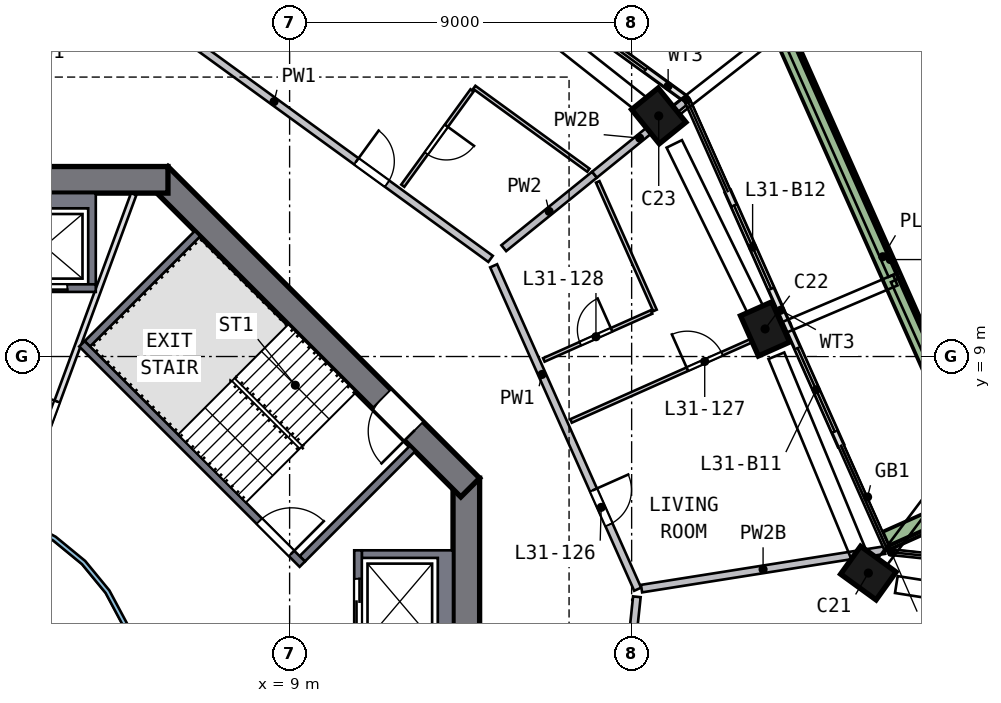
"""IFC4 building model, lengths in metres.
Left out: names, types, materials, properties, quantities, classifications, styles, units other than length and angle.
Written with IfcOpenShell. Run it as: python <this file> out.ifc"""

import sys

from ifc_helpers import new_model, si_unit, direction, frame, frame_2d, origin, origin_2d, place, context, subcontext, project, spatial, polyline, rectangle, outline, extrude, element, fill, save


model = new_model("IFC4")
c1 = context("Model", 3, precision=1e-05, world=origin(), true_north=direction((0.0, 1.0)))
c2 = subcontext(c1, "Body", "Model", "MODEL_VIEW")
j1 = project(units=[si_unit("LENGTHUNIT", "METRE"), si_unit("PLANEANGLEUNIT", "RADIAN")], contexts=[c1])
p1 = place(None, origin())
s1 = spatial("IfcSite", under=j1, at=p1, CompositionType="ELEMENT")
p2 = place(p1, origin())
s2 = spatial("IfcBuilding", under=s1, at=p2, CompositionType="ELEMENT")
p3 = place(p2, frame((0.0, 0.0, 133.0)))
s3 = spatial("IfcBuildingStorey", under=s2, at=p3, CompositionType="ELEMENT", Elevation=133.0)
p4 = place(p3, frame((24.248, 3.163, 0.0), z_axis=(-0.015963111, 0.115238461, 0.993209583), x_axis=(0.810116199, -0.580730164, 0.080400377)))
e1 = element("IfcColumn", 1, at=p4, inside=s3, PredefinedType="COLUMN", context=c2, shape_type="SweptSolid", body=[
    extrude(rectangle(XDim=1.15, YDim=0.9, at=origin_2d()), origin(), (0.0, 0.0, 1.0), 3.212),
])
p5 = place(p3, frame((21.567, 9.602, 0.0), z_axis=(-0.046542786, 0.102211608, 0.993673264), x_axis=(-0.40410505, 0.907792136, -0.112305596)))
e2 = element("IfcColumn", 2, at=p5, inside=s3, PredefinedType="COLUMN", context=c2, shape_type="SweptSolid", body=[
    extrude(rectangle(XDim=1.15, YDim=0.9, at=origin_2d()), origin(), (0.0, 0.0, 1.0), 3.21),
])
p6 = place(p3, frame((18.801, 15.225, 0.0), z_axis=(-0.073137387, 0.088798823, 0.993360806), x_axis=(0.62500061, -0.772101593, 0.115036373)))
e3 = element("IfcColumn", 3, at=p6, inside=s3, PredefinedType="COLUMN", context=c2, shape_type="SweptSolid", body=[
    extrude(rectangle(XDim=1.15, YDim=0.9, at=origin_2d()), origin(), (0.0, 0.0, 1.0), 3.211),
])
p7 = place(p3, frame((13.65, -5.799, 0.0), z_axis=(0.0, 0.0, 1.0), x_axis=(0.0, 1.0, 0.0)))
e4 = element("IfcWall", 4, at=p7, inside=s3, PredefinedType="SHEAR", context=c2, shape_type="SweptSolid", body=[
    extrude(rectangle(XDim=11.598, YDim=0.7, at=frame_2d((5.799, 0.0))), origin(), (0.0, 0.0, 1.0), 3.5),
])
p8 = place(p7, frame((4.899, 0.0, 0.0)))
e5 = element("IfcOpeningElement", 5, at=p8, cuts=e4, PredefinedType="OPENING", context=c2, shape_type="SweptSolid", body=[
    extrude(rectangle(XDim=1.8, YDim=2.1, at=frame_2d((0.9, 1.05))), frame((0.0, 0.36, 0.0), z_axis=(0.0, -1.0, 0.0), x_axis=(1.0, 0.0, 0.0)), (0.0, 0.0, 1.0), 0.72),
])
p9 = place(p3, frame((13.752, 5.552, 0.0), z_axis=(0.0, 0.0, 1.0), x_axis=(-0.707106781, 0.707106781, 0.0)))
e6 = element("IfcWall", 6, at=p9, inside=s3, PredefinedType="SHEAR", context=c2, shape_type="SweptSolid", body=[
    extrude(rectangle(XDim=11.598, YDim=0.7, at=frame_2d((5.799, 0.0))), origin(), (0.0, 0.0, 1.0), 3.5),
])
p10 = place(p9, frame((2.099, 0.0, 0.0)))
e7 = element("IfcOpeningElement", 7, at=p10, cuts=e6, PredefinedType="OPENING", context=c2, shape_type="SweptSolid", body=[
    extrude(rectangle(XDim=1.2, YDim=2.1, at=frame_2d((0.6, 1.05))), frame((0.0, 0.36, 0.0), z_axis=(0.0, -1.0, 0.0), x_axis=(1.0, 0.0, 0.0)), (0.0, 0.0, 1.0), 0.72),
])
p11 = place(p3, frame((5.799, 13.65, 0.0), z_axis=(0.0, 0.0, 1.0), x_axis=(-1.0, 0.0, 0.0)))
e8 = element("IfcWall", 8, at=p11, inside=s3, PredefinedType="SHEAR", context=c2, shape_type="SweptSolid", body=[
    extrude(rectangle(XDim=11.598, YDim=0.7, at=frame_2d((5.799, 0.0))), origin(), (0.0, 0.0, 1.0), 3.5),
])
p12 = place(p11, frame((4.899, 0.0, 0.0)))
e9 = element("IfcOpeningElement", 9, at=p12, cuts=e8, PredefinedType="OPENING", context=c2, shape_type="SweptSolid", body=[
    extrude(rectangle(XDim=1.8, YDim=2.1, at=frame_2d((0.9, 1.05))), frame((0.0, 0.36, 0.0), z_axis=(0.0, -1.0, 0.0), x_axis=(1.0, 0.0, 0.0)), (0.0, 0.0, 1.0), 0.72),
])
p13 = place(p3, frame((23.506, 6.662, 0.0), z_axis=(0.0, 0.0, 1.0), x_axis=(-0.406718549, 0.913553514, 0.0)))
e10 = element("IfcWall", 10, at=p13, inside=s3, PredefinedType="SOLIDWALL", context=c2, shape_type="SweptSolid", body=[
    extrude(rectangle(XDim=3.475, YDim=0.15, at=frame_2d((1.737, 0.0))), origin(), (0.0, 0.0, 1.0), 2.475),
])
p14 = place(p13, frame((0.4, 0.0, 0.0)))
e11 = element("IfcOpeningElement", 11, at=p14, cuts=e10, PredefinedType="OPENING", context=c2, shape_type="SweptSolid", body=[
    extrude(rectangle(XDim=2.4, YDim=2.4, at=frame_2d((1.2, 1.2))), frame((0.0, 0.085, 0.0), z_axis=(0.0, -1.0, 0.0), x_axis=(1.0, 0.0, 0.0)), (0.0, 0.0, 1.0), 0.17),
])
p15 = place(p3, frame((22.093, 9.836, 0.0), z_axis=(0.0, 0.0, 1.0), x_axis=(-0.406740782, 0.913543615, 0.0)))
e12 = element("IfcWall", 12, at=p15, inside=s3, PredefinedType="SOLIDWALL", context=c2, shape_type="SweptSolid", body=[
    extrude(rectangle(XDim=3.835, YDim=0.15, at=frame_2d((1.918, 0.0))), origin(), (0.0, 0.0, 1.0), 2.475),
])
p16 = place(p15, frame((1.035, 0.0, 0.0)))
e13 = element("IfcOpeningElement", 13, at=p16, cuts=e12, PredefinedType="OPENING", context=c2, shape_type="SweptSolid", body=[
    extrude(rectangle(XDim=2.4, YDim=2.4, at=frame_2d((1.2, 1.2))), frame((0.0, 0.085, 0.0), z_axis=(0.0, -1.0, 0.0), x_axis=(1.0, 0.0, 0.0)), (0.0, 0.0, 1.0), 0.17),
])
p17 = place(p3, frame((19.392, 15.803, 0.0), z_axis=(0.0, 0.0, 1.0), x_axis=(-0.808990358, 0.587821913, 0.0)))
e14 = element("IfcWall", 14, at=p17, inside=s3, PredefinedType="SOLIDWALL", context=c2, shape_type="SweptSolid", body=[
    extrude(rectangle(XDim=4.068, YDim=0.15, at=frame_2d((2.034, 0.0))), origin(), (0.0, 0.0, 1.0), 2.475),
])
p18 = place(p17, frame((1.268, 0.0, 0.0)))
e15 = element("IfcOpeningElement", 15, at=p18, cuts=e14, PredefinedType="OPENING", context=c2, shape_type="SweptSolid", body=[
    extrude(rectangle(XDim=2.4, YDim=2.4, at=frame_2d((1.2, 1.2))), frame((0.0, 0.085, 0.0), z_axis=(0.0, -1.0, 0.0), x_axis=(1.0, 0.0, 0.0)), (0.0, 0.0, 1.0), 0.17),
])
p19 = place(p3, frame((24.704, 4.157, 0.0), z_axis=(0.0, 0.0, 1.0), x_axis=(0.913528084, 0.406775663, 0.0)))
e16 = element("IfcWall", 16, at=p19, inside=s3, PredefinedType="SOLIDWALL", context=c2, shape_type="SweptSolid", body=[
    extrude(rectangle(XDim=3.199, YDim=0.5, at=frame_2d((1.6, 0.0))), origin(), (0.0, 0.0, 1.0), 0.7),
])
p20 = place(p3, frame((27.296, 5.585, 0.0), z_axis=(0.0, 0.0, 1.0), x_axis=(-0.406737947, 0.913544877, 0.0)))
e17 = element("IfcWall", 17, at=p20, inside=s3, PredefinedType="SOLIDWALL", context=c2, shape_type="SweptSolid", body=[
    extrude(rectangle(XDim=13.223, YDim=0.5, at=frame_2d((6.612, 0.0))), origin(), (0.0, 0.0, 1.0), 0.7),
])
p21 = place(p3, origin())
e18 = element("IfcWall", 18, at=p21, inside=s3, PredefinedType="SOLIDWALL", context=c2, shape_type="SweptSolid", body=[
    extrude(outline(polyline([(13.3, 3.9), (13.3, 1.2), (10.9, 1.2), (10.9, 1.4), (12.9, 1.4), (12.9, 3.7), (10.9, 3.7), (10.9, 3.9), (13.3, 3.9)])), origin(), (0.0, 0.0, 1.0), 3.19),
])
p22 = place(p3, frame((10.8, 1.2, 0.0), z_axis=(0.0, 0.0, 1.0), x_axis=(0.0, 1.0, 0.0)))
e19 = element("IfcWall", 19, at=p22, inside=s3, PredefinedType="SOLIDWALL", context=c2, shape_type="SweptSolid", body=[
    extrude(rectangle(XDim=2.7, YDim=0.2, at=frame_2d((1.35, 0.0))), origin(), (0.0, 0.0, 1.0), 3.19),
])
p23 = place(p22, frame((0.75, 0.0, 0.0)))
e20 = element("IfcOpeningElement", 20, at=p23, cuts=e19, PredefinedType="OPENING", context=c2, shape_type="SweptSolid", body=[
    extrude(rectangle(XDim=1.2, YDim=2.1, at=frame_2d((0.6, 1.05))), frame((0.0, 0.11, 0.0), z_axis=(0.0, -1.0, 0.0), x_axis=(1.0, 0.0, 0.0)), (0.0, 0.0, 1.0), 0.22),
])
p24 = place(p3, origin())
e21 = element("IfcWall", 21, at=p24, inside=s3, PredefinedType="SOLIDWALL", context=c2, shape_type="SweptSolid", body=[
    extrude(outline(polyline([(3.9, 13.3), (3.9, 10.9), (3.7, 10.9), (3.7, 12.9), (1.4, 12.9), (1.4, 10.9), (1.2, 10.9), (1.2, 13.3), (3.9, 13.3)])), origin(), (0.0, 0.0, 1.0), 3.19),
])
p25 = place(p3, frame((1.2, 10.8, 0.0), z_axis=(0.0, 0.0, 1.0), x_axis=(1.0, 0.0, 0.0)))
e22 = element("IfcWall", 22, at=p25, inside=s3, PredefinedType="SOLIDWALL", context=c2, shape_type="SweptSolid", body=[
    extrude(rectangle(XDim=2.7, YDim=0.2, at=frame_2d((1.35, 0.0))), origin(), (0.0, 0.0, 1.0), 3.19),
])
p26 = place(p25, frame((0.75, 0.0, 0.0)))
e23 = element("IfcOpeningElement", 23, at=p26, cuts=e22, PredefinedType="OPENING", context=c2, shape_type="SweptSolid", body=[
    extrude(rectangle(XDim=1.2, YDim=2.1, at=frame_2d((0.6, 1.05))), frame((0.0, 0.11, 0.0), z_axis=(0.0, -1.0, 0.0), x_axis=(1.0, 0.0, 0.0)), (0.0, 0.0, 1.0), 0.22),
])
p27 = place(p3, frame((3.535, 9.334, 0.0), z_axis=(0.0, 0.0, 1.0), x_axis=(0.707106781, -0.707106781, 0.0)))
e24 = element("IfcWall", 24, at=p27, inside=s3, PredefinedType="SOLIDWALL", context=c2, shape_type="SweptSolid", body=[
    extrude(rectangle(XDim=8.2, YDim=0.2, at=frame_2d((4.1, 0.0))), origin(), (0.0, 0.0, 1.0), 3.19),
])
p28 = place(p27, frame((6.6, 0.0, 0.0)))
e25 = element("IfcOpeningElement", 25, at=p28, cuts=e24, PredefinedType="OPENING", context=c2, shape_type="SweptSolid", body=[
    extrude(rectangle(XDim=1.2, YDim=2.1, at=frame_2d((0.6, 1.05))), frame((0.0, 0.11, 0.0), z_axis=(0.0, -1.0, 0.0), x_axis=(1.0, 0.0, 0.0)), (0.0, 0.0, 1.0), 0.22),
])
for number, where, z_axis, x_axis in (
    (26, (9.334, 3.677, 0.0), (0.0, 0.0, 1.0), (0.707, 0.707, 0.0)),
    (27, (3.677, 9.334, 0.0), (0.0, 0.0, 1.0), (0.707, 0.707, 0.0)),
):
    element("IfcWall", number, at=place(p3, frame(where, z_axis=z_axis, x_axis=x_axis)), inside=s3, PredefinedType="SOLIDWALL", context=c2, shape_type="SweptSolid", body=[
        extrude(rectangle(XDim=4.1, YDim=0.2, at=frame_2d((2.05, 0.0))), origin(), (0.0, 0.0, 1.0), 3.19),
    ])
p29 = place(p3, frame((1.776, 4.813, 0.0), z_axis=(0.0, 0.0, 1.0), x_axis=(0.346109381, 0.938194168, 0.0)))
e28 = element("IfcWall", 28, at=p29, inside=s3, PredefinedType="PARTITIONING", context=c2, shape_type="SweptSolid", body=[
    extrude(rectangle(XDim=9.016, YDim=0.15, at=frame_2d((4.508, 0.0))), origin(), (0.0, 0.0, 1.0), 3.19),
])
p30 = place(p29, frame((1.4, 0.0, 0.0)))
e29 = element("IfcOpeningElement", 29, at=p30, cuts=e28, PredefinedType="OPENING", context=c2, shape_type="SweptSolid", body=[
    extrude(rectangle(XDim=1.8, YDim=2.1, at=frame_2d((0.9, 1.05))), frame((0.0, 0.085, 0.0), z_axis=(0.0, -1.0, 0.0), x_axis=(1.0, 0.0, 0.0)), (0.0, 0.0, 1.0), 0.17),
])
p31 = place(p3, origin())
e30 = element("IfcWall", 30, at=p31, inside=s3, PredefinedType="SOLIDWALL", context=c2, shape_type="SweptSolid", body=[
    extrude(outline(polyline([(5.021, -0.999), (4.73, -1.959), (4.257, -2.844), (3.62, -3.62), (2.844, -4.257), (1.959, -4.73), (0.999, -5.021), (0.0, -5.12), (-0.999, -5.021), (-1.959, -4.73), (-2.844, -4.257), (-3.62, -3.62), (-4.257, -2.844), (-4.73, -1.959), (-5.021, -0.999), (-5.12, 0.0), (-5.021, 0.999), (-4.73, 1.959), (-4.257, 2.844), (-3.62, 3.62), (-2.844, 4.257), (-1.959, 4.73), (-0.999, 5.021), (0.0, 5.12), (0.999, 5.021), (1.959, 4.73), (2.844, 4.257), (3.62, 3.62), (4.257, 2.844), (4.73, 1.959), (5.021, 0.999), (5.12, 0.0), (5.021, -0.999)]), holes=[polyline([(4.904, 0.976), (4.619, 1.913), (4.157, 2.778), (3.535, 3.535), (2.778, 4.157), (1.913, 4.619), (0.976, 4.904), (0.0, 5.0), (-0.976, 4.904), (-1.913, 4.619), (-2.778, 4.157), (-3.535, 3.535), (-4.157, 2.778), (-4.619, 1.913), (-4.904, 0.976), (-5.0, 0.0), (-4.904, -0.976), (-4.619, -1.913), (-4.157, -2.778), (-3.535, -3.535), (-2.778, -4.157), (-1.913, -4.619), (-0.976, -4.904), (0.0, -5.0), (0.976, -4.904), (1.913, -4.619), (2.778, -4.157), (3.535, -3.535), (4.157, -2.778), (4.619, -1.913), (4.904, -0.976), (5.0, 0.0), (4.904, 0.976)])]), origin(), (0.0, 0.0, 1.0), 3.19),
])
p32 = place(p3, frame((6.589, 17.163, 0.0), z_axis=(0.0, 0.0, 1.0), x_axis=(0.809014458, -0.587788744, 0.0)))
e31 = element("IfcWall", 31, at=p32, inside=s3, PredefinedType="SOLIDWALL", context=c2, shape_type="SweptSolid", body=[
    extrude(rectangle(XDim=9.516, YDim=0.2, at=frame_2d((4.758, 0.0))), origin(), (0.0, 0.0, 1.0), 3.19),
])
p33 = place(p32, frame((5.15, 0.0, 0.0)))
e32 = element("IfcOpeningElement", 32, at=p33, cuts=e31, PredefinedType="OPENING", context=c2, shape_type="SweptSolid", body=[
    extrude(rectangle(XDim=1.0, YDim=2.1, at=frame_2d((0.5, 1.05))), frame((0.0, 0.11, 0.0), z_axis=(0.0, -1.0, 0.0), x_axis=(1.0, 0.0, 0.0)), (0.0, 0.0, 1.0), 0.22),
])
p34 = place(p3, frame((14.369, 11.387, 0.0), z_axis=(0.0, 0.0, 1.0), x_axis=(0.406746212, -0.913541197, 0.0)))
e33 = element("IfcWall", 33, at=p34, inside=s3, PredefinedType="SOLIDWALL", context=c2, shape_type="SweptSolid", body=[
    extrude(rectangle(XDim=9.317, YDim=0.2, at=frame_2d((4.658, 0.0))), origin(), (0.0, 0.0, 1.0), 3.19),
])
p35 = place(p34, frame((6.458, 0.0, 0.0)))
e34 = element("IfcOpeningElement", 34, at=p35, cuts=e33, PredefinedType="OPENING", context=c2, shape_type="SweptSolid", body=[
    extrude(rectangle(XDim=1.0, YDim=2.1, at=frame_2d((0.5, 1.05))), frame((0.0, 0.11, 0.0), z_axis=(0.0, -1.0, 0.0), x_axis=(1.0, 0.0, 0.0)), (0.0, 0.0, 1.0), 0.22),
])
p36 = place(p3, frame((17.797, -0.563, 0.0), z_axis=(0.0, 0.0, 1.0), x_axis=(0.104524868, 0.994522273, 0.0)))
e35 = element("IfcWall", 35, at=p36, inside=s3, PredefinedType="SOLIDWALL", context=c2, shape_type="SweptSolid", body=[
    extrude(rectangle(XDim=3.258, YDim=0.2, at=frame_2d((1.629, 0.0))), origin(), (0.0, 0.0, 1.0), 3.19),
])
p37 = place(p3, frame((14.635, 11.851, 0.0), z_axis=(0.0, 0.0, 1.0), x_axis=(0.77712644, 0.629344497, 0.0)))
e36 = element("IfcWall", 36, at=p37, inside=s3, PredefinedType="SOLIDWALL", context=c2, shape_type="SweptSolid", body=[
    extrude(rectangle(XDim=3.073, YDim=0.2, at=frame_2d((1.536, 0.0))), origin(), (0.0, 0.0, 1.0), 3.19),
])
p38 = place(p3, frame((17.023, 13.785, 0.0), z_axis=(0.0, 0.0, 1.0), x_axis=(0.777133351, 0.629335963, 0.0)))
e37 = element("IfcWall", 37, at=p38, inside=s3, PredefinedType="SOLIDWALL", context=c2, shape_type="SweptSolid", body=[
    extrude(rectangle(XDim=3.059, YDim=0.2, at=frame_2d((1.53, 0.0))), origin(), (0.0, 0.0, 1.0), 2.69),
])
p39 = place(p3, frame((18.261, 2.892, 0.0), z_axis=(0.0, 0.0, 1.0), x_axis=(0.987684586, 0.156458166, 0.0)))
e38 = element("IfcWall", 38, at=p39, inside=s3, PredefinedType="SOLIDWALL", context=c2, shape_type="SweptSolid", body=[
    extrude(rectangle(XDim=6.476, YDim=0.2, at=frame_2d((3.238, 0.0))), origin(), (0.0, 0.0, 1.0), 2.69),
])
p40 = place(p3, frame((13.8, 16.003, 0.0), z_axis=(0.0, 0.0, 1.0), x_axis=(-0.58778294, -0.809018674, 0.0)))
e39 = element("IfcWall", 39, at=p40, inside=s3, PredefinedType="PARTITIONING", context=c2, shape_type="SweptSolid", body=[
    extrude(rectangle(XDim=3.1, YDim=0.1, at=frame_2d((1.55, 0.0))), origin(), (0.0, 0.0, 1.0), 3.19),
])
p41 = place(p40, frame((1.15, 0.0, 0.0)))
e40 = element("IfcOpeningElement", 40, at=p41, cuts=e39, PredefinedType="OPENING", context=c2, shape_type="SweptSolid", body=[
    extrude(rectangle(XDim=0.9, YDim=2.1, at=frame_2d((0.45, 1.05))), frame((0.0, 0.06, 0.0), z_axis=(0.0, -1.0, 0.0), x_axis=(1.0, 0.0, 0.0)), (0.0, 0.0, 1.0), 0.12),
])
p42 = place(p3, frame((13.859, 16.084, 0.0), z_axis=(0.0, 0.0, 1.0), x_axis=(0.808994891, -0.587815674, 0.0)))
e41 = element("IfcWall", 41, at=p42, inside=s3, PredefinedType="PARTITIONING", context=c2, shape_type="SweptSolid", body=[
    extrude(rectangle(XDim=3.711, YDim=0.1, at=frame_2d((1.855, 0.0))), origin(), (0.0, 0.0, 1.0), 3.19),
])
p43 = place(p3, frame((15.691, 8.911, 0.0), z_axis=(0.0, 0.0, 1.0), x_axis=(0.913564558, 0.40669374, 0.0)))
e42 = element("IfcWall", 42, at=p43, inside=s3, PredefinedType="PARTITIONING", context=c2, shape_type="SweptSolid", body=[
    extrude(rectangle(XDim=3.1, YDim=0.1, at=frame_2d((1.55, 0.0))), origin(), (0.0, 0.0, 1.0), 3.19),
])
p44 = place(p43, frame((1.05, 0.0, 0.0)))
e43 = element("IfcOpeningElement", 43, at=p44, cuts=e42, PredefinedType="OPENING", context=c2, shape_type="SweptSolid", body=[
    extrude(rectangle(XDim=0.9, YDim=2.1, at=frame_2d((0.45, 1.05))), frame((0.0, 0.06, 0.0), z_axis=(0.0, -1.0, 0.0), x_axis=(1.0, 0.0, 0.0)), (0.0, 0.0, 1.0), 0.12),
])
p45 = place(p3, frame((18.614, 10.212, 0.0), z_axis=(0.0, 0.0, 1.0), x_axis=(-0.406743817, 0.913542263, 0.0)))
e44 = element("IfcWall", 44, at=p45, inside=s3, PredefinedType="PARTITIONING", context=c2, shape_type="SweptSolid", body=[
    extrude(rectangle(XDim=3.704, YDim=0.1, at=frame_2d((1.852, 0.0))), origin(), (0.0, 0.0, 1.0), 3.19),
])
p46 = place(p3, frame((16.406, 7.304, 0.0), z_axis=(0.0, 0.0, 1.0), x_axis=(0.913546162, 0.406735062, 0.0)))
e45 = element("IfcWall", 45, at=p46, inside=s3, PredefinedType="PARTITIONING", context=c2, shape_type="SweptSolid", body=[
    extrude(rectangle(XDim=6.15, YDim=0.1, at=frame_2d((3.075, 0.0))), origin(), (0.0, 0.0, 1.0), 3.19),
])
p47 = place(p46, frame((3.35, 0.0, 0.0)))
e46 = element("IfcOpeningElement", 46, at=p47, cuts=e45, PredefinedType="OPENING", context=c2, shape_type="SweptSolid", body=[
    extrude(rectangle(XDim=1.0, YDim=2.1, at=frame_2d((0.5, 1.05))), frame((0.0, 0.06, 0.0), z_axis=(0.0, -1.0, 0.0), x_axis=(1.0, 0.0, 0.0)), (0.0, 0.0, 1.0), 0.12),
])
p48 = place(p14, origin())
e47 = element("IfcDoor", 47, at=p48, inside=s3, OperationType="SLIDING_TO_RIGHT", PredefinedType="DOOR", context=c2, shape_type="SweptSolid", body=[
    extrude(rectangle(XDim=2.4, YDim=2.4, at=frame_2d((1.2, 1.2))), frame((0.0, 0.025, 0.0), z_axis=(0.0, -1.0, 0.0), x_axis=(1.0, 0.0, 0.0)), (0.0, 0.0, 1.0), 0.05),
])
fill(e11, e47)
p49 = place(p16, origin())
e48 = element("IfcDoor", 48, at=p49, inside=s3, OperationType="SLIDING_TO_LEFT", PredefinedType="DOOR", context=c2, shape_type="SweptSolid", body=[
    extrude(rectangle(XDim=2.4, YDim=2.4, at=frame_2d((1.2, 1.2))), frame((0.0, 0.025, 0.0), z_axis=(0.0, -1.0, 0.0), x_axis=(1.0, 0.0, 0.0)), (0.0, 0.0, 1.0), 0.05),
])
fill(e13, e48)
p50 = place(p18, origin())
e49 = element("IfcDoor", 49, at=p50, inside=s3, OperationType="SLIDING_TO_LEFT", PredefinedType="DOOR", context=c2, shape_type="SweptSolid", body=[
    extrude(rectangle(XDim=2.4, YDim=2.4, at=frame_2d((1.2, 1.2))), frame((0.0, 0.025, 0.0), z_axis=(0.0, -1.0, 0.0), x_axis=(1.0, 0.0, 0.0)), (0.0, 0.0, 1.0), 0.05),
])
fill(e15, e49)
p51 = place(p23, origin())
e50 = element("IfcDoor", 50, at=p51, inside=s3, OperationType="DOUBLE_DOOR_SLIDING", PredefinedType="DOOR", context=c2, shape_type="SweptSolid", body=[
    extrude(rectangle(XDim=1.2, YDim=2.1, at=frame_2d((0.6, 1.05))), frame((0.0, 0.025, 0.0), z_axis=(0.0, -1.0, 0.0), x_axis=(1.0, 0.0, 0.0)), (0.0, 0.0, 1.0), 0.05),
])
fill(e20, e50)
p52 = place(p26, origin())
e51 = element("IfcDoor", 51, at=p52, inside=s3, OperationType="DOUBLE_DOOR_SLIDING", PredefinedType="DOOR", context=c2, shape_type="SweptSolid", body=[
    extrude(rectangle(XDim=1.2, YDim=2.1, at=frame_2d((0.6, 1.05))), frame((0.0, 0.025, 0.0), z_axis=(0.0, -1.0, 0.0), x_axis=(1.0, 0.0, 0.0)), (0.0, 0.0, 1.0), 0.05),
])
fill(e23, e51)
p53 = place(p28, origin())
e52 = element("IfcDoor", 52, at=p53, inside=s3, OperationType="SINGLE_SWING_RIGHT", PredefinedType="DOOR", context=c2, shape_type="SweptSolid", body=[
    extrude(rectangle(XDim=1.2, YDim=2.1, at=frame_2d((0.6, 1.05))), frame((0.0, 0.025, 0.0), z_axis=(0.0, -1.0, 0.0), x_axis=(1.0, 0.0, 0.0)), (0.0, 0.0, 1.0), 0.05),
])
fill(e25, e52)
p54 = place(p10, origin())
e53 = element("IfcDoor", 53, at=p54, inside=s3, OperationType="SINGLE_SWING_LEFT", PredefinedType="DOOR", context=c2, shape_type="SweptSolid", body=[
    extrude(rectangle(XDim=1.2, YDim=2.1, at=frame_2d((0.6, 1.05))), frame((0.0, 0.025, 0.0), z_axis=(0.0, -1.0, 0.0), x_axis=(1.0, 0.0, 0.0)), (0.0, 0.0, 1.0), 0.05),
])
fill(e7, e53)
p55 = place(p30, origin())
e54 = element("IfcDoor", 54, at=p55, inside=s3, OperationType="DOUBLE_DOOR_SINGLE_SWING", PredefinedType="DOOR", context=c2, shape_type="SweptSolid", body=[
    extrude(rectangle(XDim=1.8, YDim=2.1, at=frame_2d((0.9, 1.05))), frame((0.0, 0.025, 0.0), z_axis=(0.0, -1.0, 0.0), x_axis=(1.0, 0.0, 0.0)), (0.0, 0.0, 1.0), 0.05),
])
fill(e29, e54)
p56 = place(p35, origin())
e55 = element("IfcDoor", 55, at=p56, inside=s3, OperationType="SINGLE_SWING_LEFT", PredefinedType="DOOR", context=c2, shape_type="SweptSolid", body=[
    extrude(rectangle(XDim=1.0, YDim=2.1, at=frame_2d((0.5, 1.05))), frame((0.0, 0.025, 0.0), z_axis=(0.0, -1.0, 0.0), x_axis=(1.0, 0.0, 0.0)), (0.0, 0.0, 1.0), 0.05),
])
fill(e34, e55)
p57 = place(p47, origin())
e56 = element("IfcDoor", 56, at=p57, inside=s3, OperationType="SINGLE_SWING_LEFT", PredefinedType="DOOR", context=c2, shape_type="SweptSolid", body=[
    extrude(rectangle(XDim=1.0, YDim=2.1, at=frame_2d((0.5, 1.05))), frame((0.0, 0.025, 0.0), z_axis=(0.0, -1.0, 0.0), x_axis=(1.0, 0.0, 0.0)), (0.0, 0.0, 1.0), 0.05),
])
fill(e46, e56)
p58 = place(p44, origin())
e57 = element("IfcDoor", 57, at=p58, inside=s3, OperationType="SINGLE_SWING_RIGHT", PredefinedType="DOOR", context=c2, shape_type="SweptSolid", body=[
    extrude(rectangle(XDim=0.9, YDim=2.1, at=frame_2d((0.45, 1.05))), frame((0.0, 0.025, 0.0), z_axis=(0.0, -1.0, 0.0), x_axis=(1.0, 0.0, 0.0)), (0.0, 0.0, 1.0), 0.05),
])
fill(e43, e57)
p59 = place(p33, origin())
e58 = element("IfcDoor", 58, at=p59, inside=s3, OperationType="SINGLE_SWING_LEFT", PredefinedType="DOOR", context=c2, shape_type="SweptSolid", body=[
    extrude(rectangle(XDim=1.0, YDim=2.1, at=frame_2d((0.5, 1.05))), frame((0.0, 0.025, 0.0), z_axis=(0.0, -1.0, 0.0), x_axis=(1.0, 0.0, 0.0)), (0.0, 0.0, 1.0), 0.05),
])
fill(e32, e58)
p60 = place(p41, origin())
e59 = element("IfcDoor", 59, at=p60, inside=s3, OperationType="SINGLE_SWING_LEFT", PredefinedType="DOOR", context=c2, shape_type="SweptSolid", body=[
    extrude(rectangle(XDim=0.9, YDim=2.1, at=frame_2d((0.45, 1.05))), frame((0.0, 0.025, 0.0), z_axis=(0.0, -1.0, 0.0), x_axis=(1.0, 0.0, 0.0)), (0.0, 0.0, 1.0), 0.05),
])
fill(e40, e59)
save(model, sys.argv[1])
